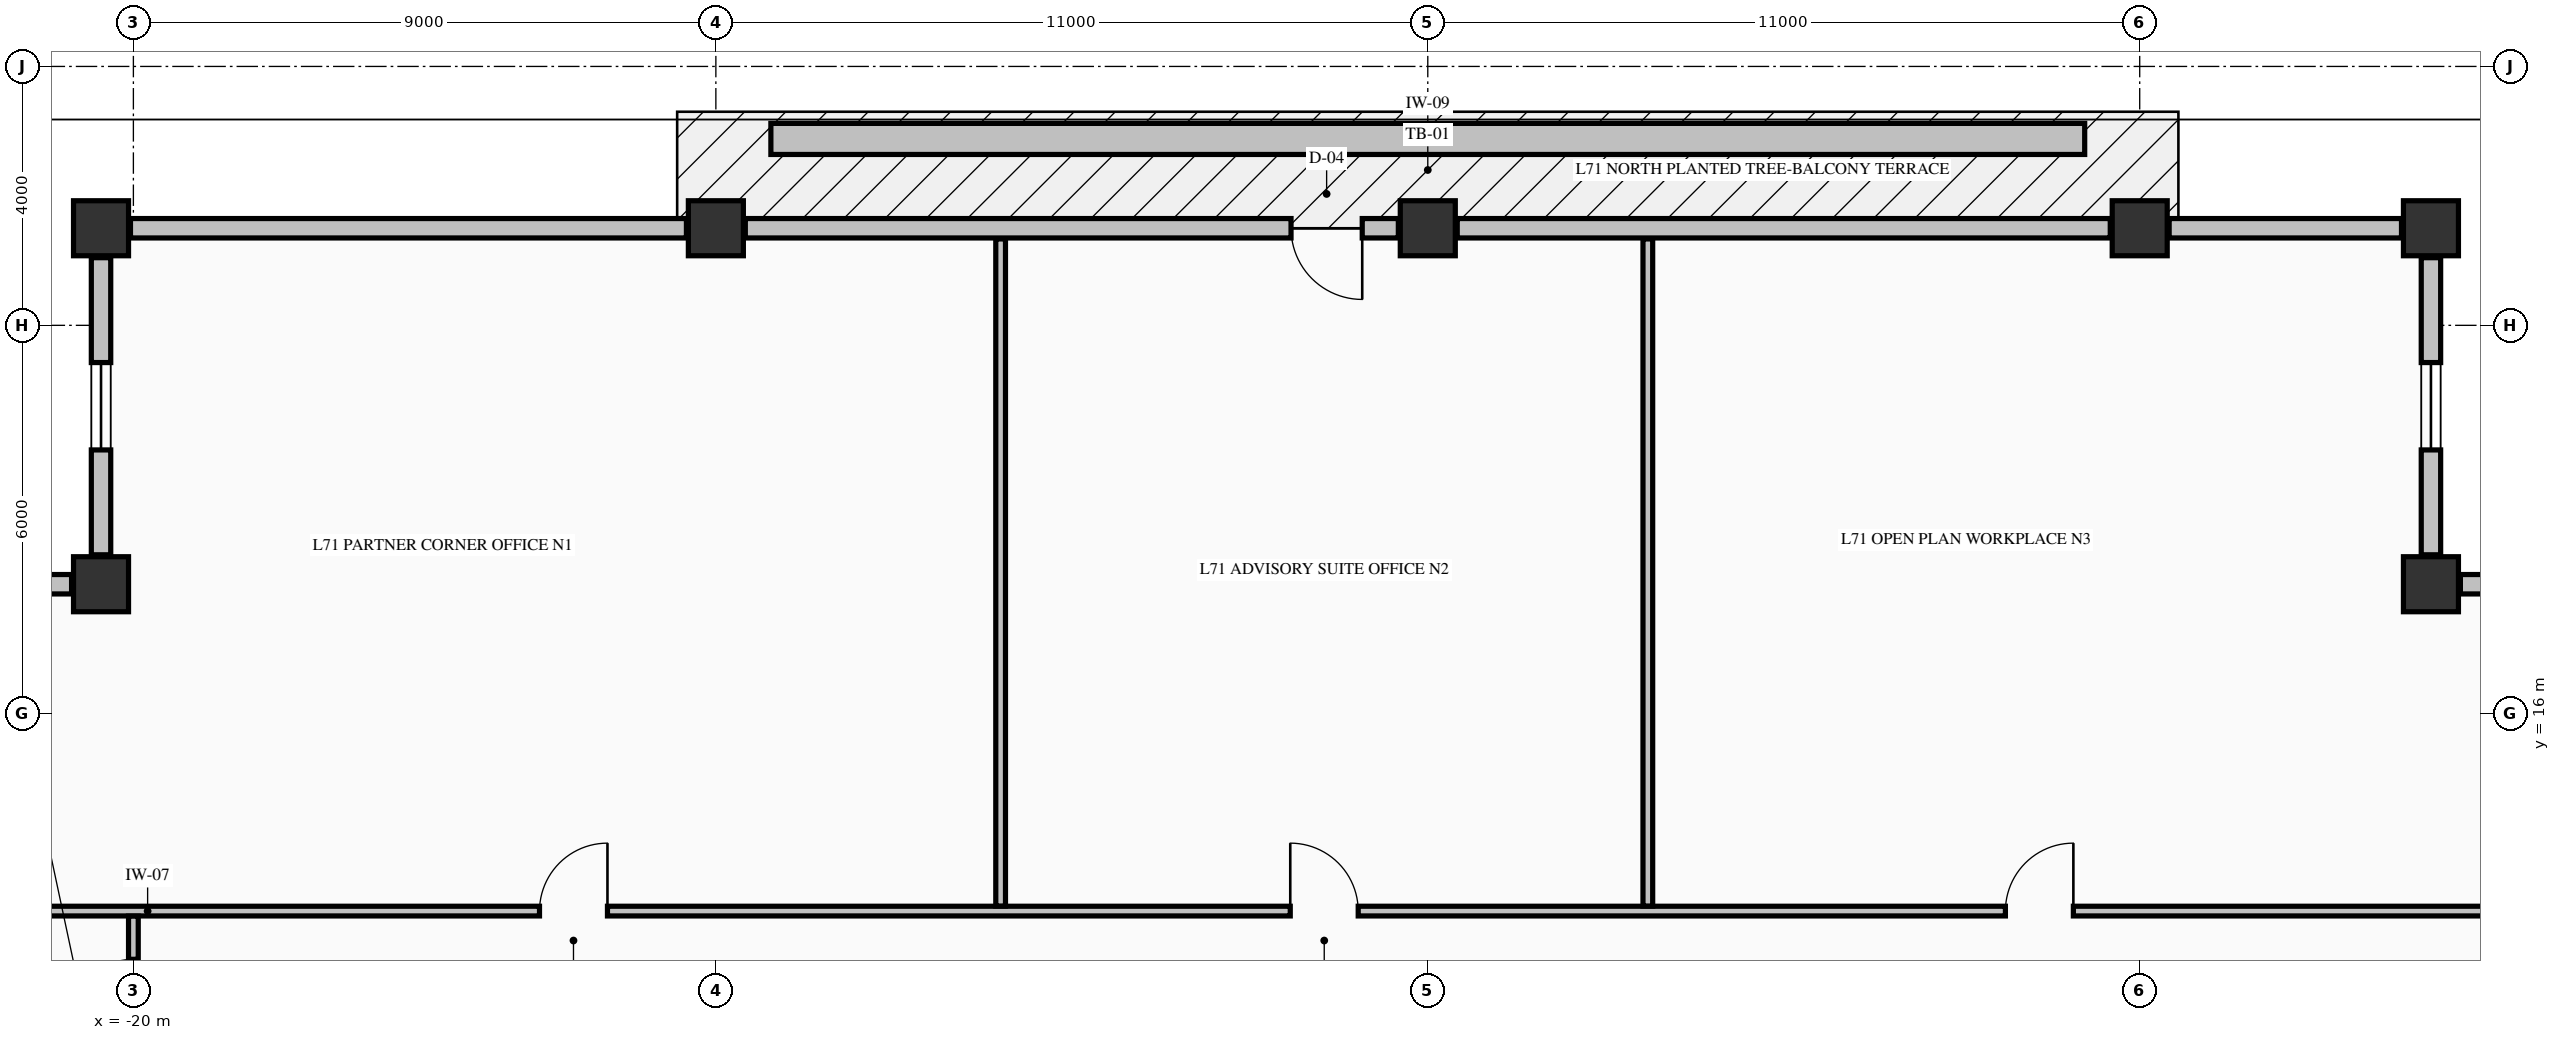
"""IFC4 building model, lengths in metres.
Left out: names, types, materials, properties, quantities, classifications, styles, units other than length and angle.
Written with IfcOpenShell. Run it as: python <this file> out.ifc"""

import sys

from ifc_helpers import new_model, si_unit, direction, frame, frame_2d, origin, origin_2d, place, context, subcontext, project, spatial, rectangle, extrude, element, fill, save


model = new_model("IFC4")
c1 = context("Model", 3, precision=1e-05, world=origin(), true_north=direction((0.0, 1.0)))
c2 = subcontext(c1, "Body", "Model", "MODEL_VIEW")
j1 = project(units=[si_unit("LENGTHUNIT", "METRE"), si_unit("PLANEANGLEUNIT", "RADIAN")], contexts=[c1])
p1 = place(None, origin())
s1 = spatial("IfcSite", under=j1, at=p1, CompositionType="ELEMENT")
p2 = place(p1, origin())
s2 = spatial("IfcBuilding", under=s1, at=p2, CompositionType="ELEMENT")
p3 = place(p2, frame((0.0, 0.0, 267.35)))
s3 = spatial("IfcBuildingStorey", under=s2, at=p3, CompositionType="ELEMENT", Elevation=267.35)
for number, where, z_axis, x_axis in (
    (1, (-20.5, 23.5, -0.25), (0.0, 0.0, 1.0), (1.0, 0.0, 0.0)),
    (2, (-11.0, 23.5, -0.25), (0.0, 0.0, 1.0), (1.0, 0.0, 0.0)),
    (3, (0.0, 23.5, -0.25), (0.0, 0.0, 1.0), (1.0, 0.0, 0.0)),
    (4, (11.0, 23.5, -0.25), (0.0, 0.0, 1.0), (1.0, 0.0, 0.0)),
    (5, (15.5, 23.5, -0.25), (0.0, 0.0, 1.0), (1.0, 0.0, 0.0)),
    (6, (15.5, 18.0, -0.25), (0.0, 0.0, 1.0), (1.0, 0.0, 0.0)),
    (7, (-20.5, 18.0, -0.25), (0.0, 0.0, 1.0), (1.0, 0.0, 0.0)),
):
    element("IfcColumn", number, at=place(p3, frame(where, z_axis=z_axis, x_axis=x_axis)), inside=s3, PredefinedType="COLUMN", context=c2, shape_type="SweptSolid", body=[
        extrude(rectangle(XDim=0.85, YDim=0.85, at=origin_2d()), origin(), (0.0, 0.0, 1.0), 3.155),
    ])
p4 = place(p3, frame((20.545, 18.0, 0.0), z_axis=(0.0, 0.0, 1.0), x_axis=(-1.0, 0.0, 0.0)))
e8 = element("IfcWall", 8, at=p4, inside=s3, PredefinedType="STANDARD", context=c2, shape_type="SweptSolid", body=[
    extrude(rectangle(XDim=4.59, YDim=0.3, at=frame_2d((2.295, 0.0))), origin(), (0.0, 0.0, 1.0), 2.297),
])
p5 = place(p4, frame((1.62, 0.0, 0.68)))
e9 = element("IfcOpeningElement", 9, at=p5, cuts=e8, PredefinedType="OPENING", context=c2, shape_type="SweptSolid", body=[
    extrude(rectangle(XDim=1.35, YDim=1.42, at=frame_2d((0.675, 0.71))), frame((0.0, 0.16, 0.0), z_axis=(0.0, -1.0, 0.0), x_axis=(1.0, 0.0, 0.0)), (0.0, 0.0, 1.0), 0.32),
])
p6 = place(p3, frame((15.5, 18.455, 0.0), z_axis=(0.0, 0.0, 1.0), x_axis=(0.0, 1.0, 0.0)))
e10 = element("IfcWall", 10, at=p6, inside=s3, PredefinedType="STANDARD", context=c2, shape_type="SweptSolid", body=[
    extrude(rectangle(XDim=4.59, YDim=0.3, at=frame_2d((2.295, 0.0))), origin(), (0.0, 0.0, 1.0), 2.297),
])
p7 = place(p6, frame((1.62, 0.0, 0.68)))
e11 = element("IfcOpeningElement", 11, at=p7, cuts=e10, PredefinedType="OPENING", context=c2, shape_type="SweptSolid", body=[
    extrude(rectangle(XDim=1.35, YDim=1.42, at=frame_2d((0.675, 0.71))), frame((0.0, 0.16, 0.0), z_axis=(0.0, -1.0, 0.0), x_axis=(1.0, 0.0, 0.0)), (0.0, 0.0, 1.0), 0.32),
])
p8 = place(p3, frame((-20.5, 23.045, 0.0), z_axis=(0.0, 0.0, 1.0), x_axis=(0.0, -1.0, 0.0)))
e12 = element("IfcWall", 12, at=p8, inside=s3, PredefinedType="STANDARD", context=c2, shape_type="SweptSolid", body=[
    extrude(rectangle(XDim=4.59, YDim=0.3, at=frame_2d((2.295, 0.0))), origin(), (0.0, 0.0, 1.0), 2.297),
])
p9 = place(p8, frame((1.62, 0.0, 0.68)))
e13 = element("IfcOpeningElement", 13, at=p9, cuts=e12, PredefinedType="OPENING", context=c2, shape_type="SweptSolid", body=[
    extrude(rectangle(XDim=1.35, YDim=1.42, at=frame_2d((0.675, 0.71))), frame((0.0, 0.16, 0.0), z_axis=(0.0, -1.0, 0.0), x_axis=(1.0, 0.0, 0.0)), (0.0, 0.0, 1.0), 0.32),
])
p10 = place(p3, frame((-20.955, 18.0, 0.0), z_axis=(0.0, 0.0, 1.0), x_axis=(-1.0, 0.0, 0.0)))
e14 = element("IfcWall", 14, at=p10, inside=s3, PredefinedType="STANDARD", context=c2, shape_type="SweptSolid", body=[
    extrude(rectangle(XDim=4.59, YDim=0.3, at=frame_2d((2.295, 0.0))), origin(), (0.0, 0.0, 1.0), 2.297),
])
p11 = place(p10, frame((1.62, 0.0, 0.68)))
e15 = element("IfcOpeningElement", 15, at=p11, cuts=e14, PredefinedType="OPENING", context=c2, shape_type="SweptSolid", body=[
    extrude(rectangle(XDim=1.35, YDim=1.42, at=frame_2d((0.675, 0.71))), frame((0.0, 0.16, 0.0), z_axis=(0.0, -1.0, 0.0), x_axis=(1.0, 0.0, 0.0)), (0.0, 0.0, 1.0), 0.32),
])
p12 = place(p3, frame((-11.455, 23.5, 0.0), z_axis=(0.0, 0.0, 1.0), x_axis=(-1.0, 0.0, 0.0)))
e16 = element("IfcWall", 16, at=p12, inside=s3, PredefinedType="STANDARD", context=c2, shape_type="SweptSolid", body=[
    extrude(rectangle(XDim=8.59, YDim=0.3, at=frame_2d((4.295, 0.0))), origin(), (0.0, 0.0, 1.0), 2.297),
])
p13 = place(p3, frame((-0.455, 23.5, 0.0), z_axis=(0.0, 0.0, 1.0), x_axis=(-1.0, 0.0, 0.0)))
e17 = element("IfcWall", 17, at=p13, inside=s3, PredefinedType="STANDARD", context=c2, shape_type="SweptSolid", body=[
    extrude(rectangle(XDim=10.09, YDim=0.3, at=frame_2d((5.045, 0.0))), origin(), (0.0, 0.0, 1.0), 2.297),
])
p14 = place(p13, frame((0.558, 0.0, 0.0)))
e18 = element("IfcOpeningElement", 18, at=p14, cuts=e17, PredefinedType="OPENING", context=c2, shape_type="SweptSolid", body=[
    extrude(rectangle(XDim=1.1, YDim=2.15, at=frame_2d((0.55, 1.075))), frame((0.0, 0.16, 0.0), z_axis=(0.0, -1.0, 0.0), x_axis=(1.0, 0.0, 0.0)), (0.0, 0.0, 1.0), 0.32),
])
p15 = place(p3, frame((10.545, 23.5, 0.0), z_axis=(0.0, 0.0, 1.0), x_axis=(-1.0, 0.0, 0.0)))
e19 = element("IfcWall", 19, at=p15, inside=s3, PredefinedType="STANDARD", context=c2, shape_type="SweptSolid", body=[
    extrude(rectangle(XDim=10.09, YDim=0.3, at=frame_2d((5.045, 0.0))), origin(), (0.0, 0.0, 1.0), 2.297),
])
p16 = place(p3, frame((15.045, 23.5, 0.0), z_axis=(0.0, 0.0, 1.0), x_axis=(-1.0, 0.0, 0.0)))
e20 = element("IfcWall", 20, at=p16, inside=s3, PredefinedType="STANDARD", context=c2, shape_type="SweptSolid", body=[
    extrude(rectangle(XDim=3.59, YDim=0.3, at=frame_2d((1.795, 0.0))), origin(), (0.0, 0.0, 1.0), 2.297),
])
p17 = place(p3, frame((-25.835, 12.95, 0.0), z_axis=(0.0, 0.0, 1.0), x_axis=(1.0, 0.0, 0.0)))
e21 = element("IfcWall", 21, at=p17, inside=s3, PredefinedType="PARTITIONING", context=c2, shape_type="SweptSolid", body=[
    extrude(rectangle(XDim=45.91, YDim=0.15, at=frame_2d((22.955, 0.0))), origin(), (0.0, 0.0, 1.0), 2.905),
])
p18 = place(p17, frame((12.11, 0.0, 0.0)))
e22 = element("IfcOpeningElement", 22, at=p18, cuts=e21, PredefinedType="OPENING", context=c2, shape_type="SweptSolid", body=[
    extrude(rectangle(XDim=1.05, YDim=2.15, at=frame_2d((0.525, 1.075))), frame((0.0, 0.085, 0.0), z_axis=(0.0, -1.0, 0.0), x_axis=(1.0, 0.0, 0.0)), (0.0, 0.0, 1.0), 0.17),
])
p19 = place(p17, frame((23.71, 0.0, 0.0)))
e23 = element("IfcOpeningElement", 23, at=p19, cuts=e21, PredefinedType="OPENING", context=c2, shape_type="SweptSolid", body=[
    extrude(rectangle(XDim=1.05, YDim=2.15, at=frame_2d((0.525, 1.075))), frame((0.0, 0.085, 0.0), z_axis=(0.0, -1.0, 0.0), x_axis=(1.0, 0.0, 0.0)), (0.0, 0.0, 1.0), 0.17),
])
p20 = place(p17, frame((34.76, 0.0, 0.0)))
e24 = element("IfcOpeningElement", 24, at=p20, cuts=e21, PredefinedType="OPENING", context=c2, shape_type="SweptSolid", body=[
    extrude(rectangle(XDim=1.05, YDim=2.15, at=frame_2d((0.525, 1.075))), frame((0.0, 0.085, 0.0), z_axis=(0.0, -1.0, 0.0), x_axis=(1.0, 0.0, 0.0)), (0.0, 0.0, 1.0), 0.17),
])
p21 = place(p3, frame((-20.0, 10.856, 0.0), z_axis=(0.0, 0.0, 1.0), x_axis=(0.0, 1.0, 0.0)))
e25 = element("IfcWall", 25, at=p21, inside=s3, PredefinedType="PARTITIONING", context=c2, shape_type="SweptSolid", body=[
    extrude(rectangle(XDim=2.016, YDim=0.15, at=frame_2d((1.008, 0.0))), origin(), (0.0, 0.0, 1.0), 2.905),
])
p22 = place(p21, frame((0.399, 0.0, 0.0)))
e26 = element("IfcOpeningElement", 26, at=p22, cuts=e25, PredefinedType="OPENING", context=c2, shape_type="SweptSolid", body=[
    extrude(rectangle(XDim=0.95, YDim=2.15, at=frame_2d((0.475, 1.075))), frame((0.0, 0.085, 0.0), z_axis=(0.0, -1.0, 0.0), x_axis=(1.0, 0.0, 0.0)), (0.0, 0.0, 1.0), 0.17),
])
for number, where, z_axis, x_axis in (
    (27, (-6.6, 13.028, 0.0), (0.0, 0.0, 1.0), (0.0, 1.0, 0.0)),
    (28, (3.4, 13.028, 0.0), (0.0, 0.0, 1.0), (0.0, 1.0, 0.0)),
):
    element("IfcWall", number, at=place(p3, frame(where, z_axis=z_axis, x_axis=x_axis)), inside=s3, PredefinedType="PARTITIONING", context=c2, shape_type="SweptSolid", body=[
        extrude(rectangle(XDim=10.307, YDim=0.15, at=frame_2d((5.153, 0.0))), origin(), (0.0, 0.0, 1.0), 2.905),
    ])
p23 = place(p3, frame((-10.15, 24.88, -0.04), z_axis=(0.0, 0.0, 1.0), x_axis=(1.0, 0.0, 0.0)))
e29 = element("IfcWall", 29, at=p23, inside=s3, PredefinedType="PARAPET", context=c2, shape_type="SweptSolid", body=[
    extrude(rectangle(XDim=20.3, YDim=0.48, at=frame_2d((10.15, 0.0))), origin(), (0.0, 0.0, 1.0), 0.52),
])
p24 = place(p7, origin())
e30 = element("IfcWindow", 30, at=p24, inside=s3, PartitioningType="SINGLE_PANEL", PredefinedType="WINDOW", context=c2, shape_type="SweptSolid", body=[
    extrude(rectangle(XDim=1.35, YDim=1.42, at=frame_2d((0.675, 0.71))), frame((0.0, 0.03, 0.0), z_axis=(0.0, -1.0, 0.0), x_axis=(1.0, 0.0, 0.0)), (0.0, 0.0, 1.0), 0.06),
])
fill(e11, e30)
p25 = place(p9, origin())
e31 = element("IfcWindow", 31, at=p25, inside=s3, PartitioningType="SINGLE_PANEL", PredefinedType="WINDOW", context=c2, shape_type="SweptSolid", body=[
    extrude(rectangle(XDim=1.35, YDim=1.42, at=frame_2d((0.675, 0.71))), frame((0.0, 0.03, 0.0), z_axis=(0.0, -1.0, 0.0), x_axis=(1.0, 0.0, 0.0)), (0.0, 0.0, 1.0), 0.06),
])
fill(e13, e31)
p26 = place(p14, origin())
e32 = element("IfcDoor", 32, at=p26, inside=s3, OperationType="SINGLE_SWING_LEFT", PredefinedType="DOOR", context=c2, shape_type="SweptSolid", body=[
    extrude(rectangle(XDim=1.1, YDim=2.15, at=frame_2d((0.55, 1.075))), frame((0.0, 0.025, 0.0), z_axis=(0.0, -1.0, 0.0), x_axis=(1.0, 0.0, 0.0)), (0.0, 0.0, 1.0), 0.05),
])
fill(e18, e32)
p27 = place(p18, origin())
e33 = element("IfcDoor", 33, at=p27, inside=s3, OperationType="SINGLE_SWING_RIGHT", PredefinedType="DOOR", context=c2, shape_type="SweptSolid", body=[
    extrude(rectangle(XDim=1.05, YDim=2.15, at=frame_2d((0.525, 1.075))), frame((0.0, 0.025, 0.0), z_axis=(0.0, -1.0, 0.0), x_axis=(1.0, 0.0, 0.0)), (0.0, 0.0, 1.0), 0.05),
])
fill(e22, e33)
p28 = place(p19, origin())
e34 = element("IfcDoor", 34, at=p28, inside=s3, OperationType="SINGLE_SWING_LEFT", PredefinedType="DOOR", context=c2, shape_type="SweptSolid", body=[
    extrude(rectangle(XDim=1.05, YDim=2.15, at=frame_2d((0.525, 1.075))), frame((0.0, 0.025, 0.0), z_axis=(0.0, -1.0, 0.0), x_axis=(1.0, 0.0, 0.0)), (0.0, 0.0, 1.0), 0.05),
])
fill(e23, e34)
p29 = place(p20, origin())
e35 = element("IfcDoor", 35, at=p29, inside=s3, OperationType="SINGLE_SWING_RIGHT", PredefinedType="DOOR", context=c2, shape_type="SweptSolid", body=[
    extrude(rectangle(XDim=1.05, YDim=2.15, at=frame_2d((0.525, 1.075))), frame((0.0, 0.025, 0.0), z_axis=(0.0, -1.0, 0.0), x_axis=(1.0, 0.0, 0.0)), (0.0, 0.0, 1.0), 0.05),
])
fill(e24, e35)
p30 = place(p22, origin())
e36 = element("IfcDoor", 36, at=p30, inside=s3, OperationType="SINGLE_SWING_LEFT", PredefinedType="DOOR", context=c2, shape_type="SweptSolid", body=[
    extrude(rectangle(XDim=0.95, YDim=2.15, at=frame_2d((0.475, 1.075))), frame((0.0, 0.025, 0.0), z_axis=(0.0, -1.0, 0.0), x_axis=(1.0, 0.0, 0.0)), (0.0, 0.0, 1.0), 0.05),
])
fill(e26, e36)
save(model, sys.argv[1])
